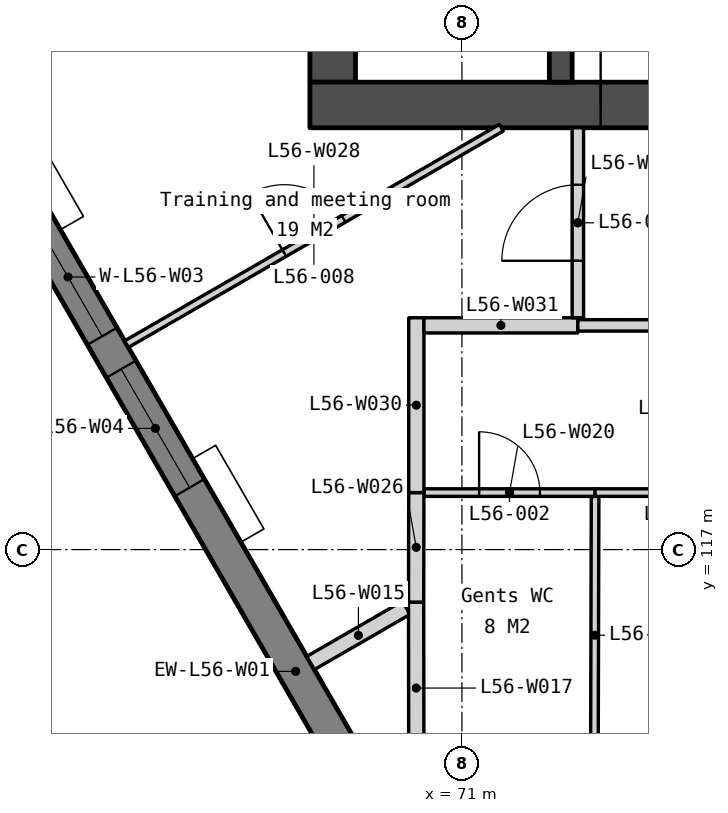
"""IFC4 building model, lengths in metres.
Left out: names, types, materials, properties, quantities, classifications, styles, units other than length and angle.
Written with IfcOpenShell. Run it as: python <this file> out.ifc"""

import sys

from ifc_helpers import new_model, si_unit, direction, frame, frame_2d, origin, place, context, subcontext, project, spatial, polyline, rectangle, outline, extrude, element, fill, save


model = new_model("IFC4")
c1 = context("Model", 3, precision=1e-05, world=origin(), true_north=direction((0.0, 1.0)))
c2 = subcontext(c1, "Body", "Model", "MODEL_VIEW")
j1 = project(units=[si_unit("LENGTHUNIT", "METRE"), si_unit("PLANEANGLEUNIT", "RADIAN")], contexts=[c1])
p1 = place(None, origin())
s1 = spatial("IfcSite", under=j1, at=p1, CompositionType="ELEMENT")
p2 = place(p1, origin())
s2 = spatial("IfcBuilding", under=s1, at=p2, CompositionType="ELEMENT")
p3 = place(p2, frame((0.0, 0.0, 223.1)))
s3 = spatial("IfcBuildingStorey", under=s2, at=p3, CompositionType="ELEMENT", Elevation=223.1)
p4 = place(p3, frame((69.3, 133.95, 0.0), z_axis=(0.0, 0.0, 1.0), x_axis=(0.0, -1.0, 0.0)))
e1 = element("IfcWall", 1, at=p4, inside=s3, PredefinedType="SOLIDWALL", context=c2, shape_type="SweptSolid", body=[
    extrude(rectangle(XDim=10.8, YDim=0.6, at=frame_2d((5.4, 0.0))), origin(), (0.0, 0.0, 1.0), 3.6),
])
p5 = place(p3, frame((69.0, 122.85, 0.0), z_axis=(0.0, 0.0, 1.0), x_axis=(1.0, 0.0, 0.0)))
e2 = element("IfcWall", 2, at=p5, inside=s3, PredefinedType="SOLIDWALL", context=c2, shape_type="SweptSolid", body=[
    extrude(rectangle(XDim=22.0, YDim=0.6, at=frame_2d((11.0, 0.0))), origin(), (0.0, 0.0, 1.0), 3.6),
])
p6 = place(p5, frame((16.375, 0.0, 0.0)))
e3 = element("IfcOpeningElement", 3, at=p6, cuts=e2, PredefinedType="OPENING", context=c2, shape_type="SweptSolid", body=[
    extrude(rectangle(XDim=1.8, YDim=2.1, at=frame_2d((0.9, 1.05))), frame((0.0, 0.31, 0.0), z_axis=(0.0, -1.0, 0.0), x_axis=(1.0, 0.0, 0.0)), (0.0, 0.0, 1.0), 0.62),
])
p7 = place(p5, frame((3.825, 0.0, 0.0)))
e4 = element("IfcOpeningElement", 4, at=p7, cuts=e2, PredefinedType="OPENING", context=c2, shape_type="SweptSolid", body=[
    extrude(rectangle(XDim=1.8, YDim=2.1, at=frame_2d((0.9, 1.05))), frame((0.0, 0.31, 0.0), z_axis=(0.0, -1.0, 0.0), x_axis=(1.0, 0.0, 0.0)), (0.0, 0.0, 1.0), 0.62),
])
p8 = place(p5, frame((12.85, 0.0, 0.0)))
e5 = element("IfcOpeningElement", 5, at=p8, cuts=e2, PredefinedType="OPENING", context=c2, shape_type="SweptSolid", body=[
    extrude(rectangle(XDim=1.5, YDim=2.1, at=frame_2d((0.75, 1.05))), frame((0.0, 0.31, 0.0), z_axis=(0.0, -1.0, 0.0), x_axis=(1.0, 0.0, 0.0)), (0.0, 0.0, 1.0), 0.62),
])
p9 = place(p3, frame((72.3, 133.95, 0.0), z_axis=(0.0, 0.0, 1.0), x_axis=(0.0, -1.0, 0.0)))
e6 = element("IfcWall", 6, at=p9, inside=s3, PredefinedType="SOLIDWALL", context=c2, shape_type="SweptSolid", body=[
    extrude(rectangle(XDim=10.8, YDim=0.3, at=frame_2d((5.4, 0.0))), origin(), (0.0, 0.0, 1.0), 3.6),
])
p10 = place(p9, frame((6.95, 0.0, 0.0)))
e7 = element("IfcOpeningElement", 7, at=p10, cuts=e6, PredefinedType="OPENING", context=c2, shape_type="SweptSolid", body=[
    extrude(rectangle(XDim=1.1, YDim=2.1, at=frame_2d((0.55, 1.05))), frame((0.0, 0.16, 0.0), z_axis=(0.0, -1.0, 0.0), x_axis=(1.0, 0.0, 0.0)), (0.0, 0.0, 1.0), 0.32),
])
p11 = place(p9, frame((9.35, 0.0, 0.0)))
e8 = element("IfcOpeningElement", 8, at=p11, cuts=e6, PredefinedType="OPENING", context=c2, shape_type="SweptSolid", body=[
    extrude(rectangle(XDim=0.9, YDim=2.1, at=frame_2d((0.45, 1.05))), frame((0.0, 0.16, 0.0), z_axis=(0.0, -1.0, 0.0), x_axis=(1.0, 0.0, 0.0)), (0.0, 0.0, 1.0), 0.32),
])
p12 = place(p9, frame((5.1, 0.0, 0.0)))
e9 = element("IfcOpeningElement", 9, at=p12, cuts=e6, PredefinedType="OPENING", context=c2, shape_type="SweptSolid", body=[
    extrude(rectangle(XDim=1.0, YDim=2.1, at=frame_2d((0.5, 1.05))), frame((0.0, 0.16, 0.0), z_axis=(0.0, -1.0, 0.0), x_axis=(1.0, 0.0, 0.0)), (0.0, 0.0, 1.0), 0.32),
])
p13 = place(p3, frame((59.13, 132.168, -0.15), z_axis=(0.0, 0.0, 1.0), x_axis=(0.500002199942, -0.866024133644, 0.0)))
e10 = element("IfcWall", 10, at=p13, inside=s3, PredefinedType="SOLIDWALL", context=c2, shape_type="SweptSolid", body=[
    extrude(outline(polyline([(38.729, 0.0), (38.729, 3.75), (0.0, 3.75), (0.0, 0.0), (38.729, 0.0)])), frame((0.0, 0.225, 0.0), z_axis=(0.0, -1.0, 0.0), x_axis=(1.0, 0.0, 0.0)), (0.0, 0.0, 1.0), 0.45),
])
p14 = place(p13, frame((2.791, 0.0, 0.95)))
e11 = element("IfcOpeningElement", 11, at=p14, cuts=e10, PredefinedType="OPENING", context=c2, shape_type="SweptSolid", body=[
    extrude(rectangle(XDim=1.8, YDim=2.2, at=frame_2d((0.9, 1.1))), frame((0.0, 0.235, 0.0), z_axis=(0.0, -1.0, 0.0), x_axis=(1.0, 0.0, 0.0)), (0.0, 0.0, 1.0), 0.47),
])
p15 = place(p13, frame((5.091, 0.0, 0.95)))
e12 = element("IfcOpeningElement", 12, at=p15, cuts=e10, PredefinedType="OPENING", context=c2, shape_type="SweptSolid", body=[
    extrude(rectangle(XDim=1.8, YDim=2.2, at=frame_2d((0.9, 1.1))), frame((0.0, 0.235, 0.0), z_axis=(0.0, -1.0, 0.0), x_axis=(1.0, 0.0, 0.0)), (0.0, 0.0, 1.0), 0.47),
])
p16 = place(p13, frame((12.473, 0.0, 0.95)))
e13 = element("IfcOpeningElement", 13, at=p16, cuts=e10, PredefinedType="OPENING", context=c2, shape_type="SweptSolid", body=[
    extrude(rectangle(XDim=1.8, YDim=2.2, at=frame_2d((0.9, 1.1))), frame((0.0, 0.235, 0.0), z_axis=(0.0, -1.0, 0.0), x_axis=(1.0, 0.0, 0.0)), (0.0, 0.0, 1.0), 0.47),
])
p17 = place(p13, frame((14.773, 0.0, 0.95)))
e14 = element("IfcOpeningElement", 14, at=p17, cuts=e10, PredefinedType="OPENING", context=c2, shape_type="SweptSolid", body=[
    extrude(rectangle(XDim=1.8, YDim=2.2, at=frame_2d((0.9, 1.1))), frame((0.0, 0.235, 0.0), z_axis=(0.0, -1.0, 0.0), x_axis=(1.0, 0.0, 0.0)), (0.0, 0.0, 1.0), 0.47),
])
p18 = place(p13, frame((22.156, 0.0, 0.95)))
e15 = element("IfcOpeningElement", 15, at=p18, cuts=e10, PredefinedType="OPENING", context=c2, shape_type="SweptSolid", body=[
    extrude(rectangle(XDim=1.8, YDim=2.2, at=frame_2d((0.9, 1.1))), frame((0.0, 0.235, 0.0), z_axis=(0.0, -1.0, 0.0), x_axis=(1.0, 0.0, 0.0)), (0.0, 0.0, 1.0), 0.47),
])
p19 = place(p13, frame((24.456, 0.0, 0.95)))
e16 = element("IfcOpeningElement", 16, at=p19, cuts=e10, PredefinedType="OPENING", context=c2, shape_type="SweptSolid", body=[
    extrude(rectangle(XDim=1.8, YDim=2.2, at=frame_2d((0.9, 1.1))), frame((0.0, 0.235, 0.0), z_axis=(0.0, -1.0, 0.0), x_axis=(1.0, 0.0, 0.0)), (0.0, 0.0, 1.0), 0.47),
])
p20 = place(p13, frame((31.838, 0.0, 0.95)))
e17 = element("IfcOpeningElement", 17, at=p20, cuts=e10, PredefinedType="OPENING", context=c2, shape_type="SweptSolid", body=[
    extrude(rectangle(XDim=1.8, YDim=2.2, at=frame_2d((0.9, 1.1))), frame((0.0, 0.235, 0.0), z_axis=(0.0, -1.0, 0.0), x_axis=(1.0, 0.0, 0.0)), (0.0, 0.0, 1.0), 0.47),
])
p21 = place(p13, frame((34.138, 0.0, 0.95)))
e18 = element("IfcOpeningElement", 18, at=p21, cuts=e10, PredefinedType="OPENING", context=c2, shape_type="SweptSolid", body=[
    extrude(rectangle(XDim=1.8, YDim=2.2, at=frame_2d((0.9, 1.1))), frame((0.0, 0.235, 0.0), z_axis=(0.0, -1.0, 0.0), x_axis=(1.0, 0.0, 0.0)), (0.0, 0.0, 1.0), 0.47),
])
p22 = place(p3, frame((69.009, 115.508, 0.0), z_axis=(0.0, 0.0, 1.0), x_axis=(0.865958882005, 0.500115201406, 0.0)))
e19 = element("IfcWall", 19, at=p22, inside=s3, PredefinedType="PARTITIONING", context=c2, shape_type="SweptSolid", body=[
    extrude(rectangle(XDim=1.453, YDim=0.2, at=frame_2d((0.727, 0.0))), origin(), (0.0, 0.0, 1.0), 3.6),
])
p23 = place(p3, frame((70.4, 114.047, 0.0), z_axis=(0.0, 0.0, 1.0), x_axis=(-0.001295195892, 0.999999161233, 0.0)))
e20 = element("IfcWall", 20, at=p23, inside=s3, PredefinedType="PARTITIONING", context=c2, shape_type="SweptSolid", body=[
    extrude(rectangle(XDim=2.262, YDim=0.2, at=frame_2d((1.131, 0.0))), origin(), (0.0, 0.0, 1.0), 3.6),
])
p24 = place(p3, frame((72.742, 114.047, 0.0), z_axis=(0.0, 0.0, 1.0), x_axis=(0.002673429826, 0.99999642638, 0.0)))
e21 = element("IfcWall", 21, at=p24, inside=s3, PredefinedType="PARTITIONING", context=c2, shape_type="SweptSolid", body=[
    extrude(rectangle(XDim=3.653, YDim=0.1, at=frame_2d((1.826, 0.0))), origin(), (0.0, 0.0, 1.0), 3.6),
])
p25 = place(p3, frame((70.5, 117.75, 0.0), z_axis=(0.0, 0.0, 1.0), x_axis=(1.0, 0.0, 0.0)))
e22 = element("IfcWall", 22, at=p25, inside=s3, PredefinedType="PARTITIONING", context=c2, shape_type="SweptSolid", body=[
    extrude(rectangle(XDim=2.252, YDim=0.1, at=frame_2d((1.126, 0.0))), origin(), (0.0, 0.0, 1.0), 3.6),
])
p26 = place(p25, frame((0.726, 0.0, 0.0)))
e23 = element("IfcOpeningElement", 23, at=p26, cuts=e22, PredefinedType="OPENING", context=c2, shape_type="SweptSolid", body=[
    extrude(rectangle(XDim=0.8, YDim=2.1, at=frame_2d((0.4, 1.05))), frame((0.0, 0.06, 0.0), z_axis=(0.0, -1.0, 0.0), x_axis=(1.0, 0.0, 0.0)), (0.0, 0.0, 1.0), 0.12),
])
p27 = place(p3, frame((72.752, 117.75, 0.0), z_axis=(0.0, 0.0, 1.0), x_axis=(1.0, 0.0, 0.0)))
e24 = element("IfcWall", 24, at=p27, inside=s3, PredefinedType="PARTITIONING", context=c2, shape_type="SweptSolid", body=[
    extrude(rectangle(XDim=2.352, YDim=0.1, at=frame_2d((1.176, 0.0))), origin(), (0.0, 0.0, 1.0), 3.6),
])
p28 = place(p27, frame((0.776, 0.0, 0.0)))
e25 = element("IfcOpeningElement", 25, at=p28, cuts=e24, PredefinedType="OPENING", context=c2, shape_type="SweptSolid", body=[
    extrude(rectangle(XDim=0.8, YDim=2.1, at=frame_2d((0.4, 1.05))), frame((0.0, 0.06, 0.0), z_axis=(0.0, -1.0, 0.0), x_axis=(1.0, 0.0, 0.0)), (0.0, 0.0, 1.0), 0.12),
])
p29 = place(p3, frame((70.397, 116.309, 0.0), z_axis=(0.0, 0.0, 1.0), x_axis=(0.002033204879, 0.999997933037, 0.0)))
e26 = element("IfcWall", 26, at=p29, inside=s3, PredefinedType="PARTITIONING", context=c2, shape_type="SweptSolid", body=[
    extrude(rectangle(XDim=1.441, YDim=0.2, at=frame_2d((0.72, 0.0))), origin(), (0.0, 0.0, 1.0), 3.6),
])
p30 = place(p3, frame((66.587, 119.703, 0.0), z_axis=(0.0, 0.0, 1.0), x_axis=(0.866023511746, 0.500003277092, 0.0)))
e27 = element("IfcWall", 27, at=p30, inside=s3, PredefinedType="PARTITIONING", context=c2, shape_type="SweptSolid", body=[
    extrude(rectangle(XDim=5.694, YDim=0.1, at=frame_2d((2.847, 0.0))), origin(), (0.0, 0.0, 1.0), 3.6),
])
p31 = place(p30, frame((2.397, 0.0, 0.0)))
e28 = element("IfcOpeningElement", 28, at=p31, cuts=e27, PredefinedType="OPENING", context=c2, shape_type="SweptSolid", body=[
    extrude(rectangle(XDim=0.9, YDim=2.1, at=frame_2d((0.45, 1.05))), frame((0.0, 0.06, 0.0), z_axis=(0.0, -1.0, 0.0), x_axis=(1.0, 0.0, 0.0)), (0.0, 0.0, 1.0), 0.12),
])
p32 = place(p3, frame((70.4, 117.75, 0.0), z_axis=(0.0, 0.0, 1.0), x_axis=(0.0, 1.0, 0.0)))
e29 = element("IfcWall", 29, at=p32, inside=s3, PredefinedType="PARTITIONING", context=c2, shape_type="SweptSolid", body=[
    extrude(rectangle(XDim=2.3, YDim=0.2, at=frame_2d((1.15, 0.0))), origin(), (0.0, 0.0, 1.0), 3.6),
])
p33 = place(p3, frame((70.5, 119.95, 0.0), z_axis=(0.0, 0.0, 1.0), x_axis=(1.0, 0.0, 0.0)))
e30 = element("IfcWall", 30, at=p33, inside=s3, PredefinedType="PARTITIONING", context=c2, shape_type="SweptSolid", body=[
    extrude(rectangle(XDim=2.025, YDim=0.2, at=frame_2d((1.012, 0.0))), origin(), (0.0, 0.0, 1.0), 3.6),
])
p34 = place(p3, frame((72.525, 120.05, 0.0), z_axis=(0.0, 0.0, 1.0), x_axis=(0.0, 1.0, 0.0)))
e31 = element("IfcWall", 31, at=p34, inside=s3, PredefinedType="PARTITIONING", context=c2, shape_type="SweptSolid", body=[
    extrude(rectangle(XDim=2.5, YDim=0.15, at=frame_2d((1.25, 0.0))), origin(), (0.0, 0.0, 1.0), 3.6),
])
p35 = place(p34, frame((0.75, 0.0, 0.0)))
e32 = element("IfcOpeningElement", 32, at=p35, cuts=e31, PredefinedType="OPENING", context=c2, shape_type="SweptSolid", body=[
    extrude(rectangle(XDim=1.0, YDim=2.1, at=frame_2d((0.5, 1.05))), frame((0.0, 0.085, 0.0), z_axis=(0.0, -1.0, 0.0), x_axis=(1.0, 0.0, 0.0)), (0.0, 0.0, 1.0), 0.17),
])
p36 = place(p3, frame((72.525, 119.95, 0.0), z_axis=(0.0, 0.0, 1.0), x_axis=(0.999999950384, -0.000315010222, 0.0)))
e33 = element("IfcWall", 33, at=p36, inside=s3, PredefinedType="PARTITIONING", context=c2, shape_type="SweptSolid", body=[
    extrude(rectangle(XDim=6.2, YDim=0.15, at=frame_2d((3.1, 0.0))), origin(), (0.0, 0.0, 1.0), 3.6),
])
p37 = place(p36, frame((2.6, 0.0, 0.0)))
e34 = element("IfcOpeningElement", 34, at=p37, cuts=e33, PredefinedType="OPENING", context=c2, shape_type="SweptSolid", body=[
    extrude(rectangle(XDim=1.0, YDim=2.1, at=frame_2d((0.5, 1.05))), frame((0.0, 0.085, 0.0), z_axis=(0.0, -1.0, 0.0), x_axis=(1.0, 0.0, 0.0)), (0.0, 0.0, 1.0), 0.17),
])
p38 = place(p7, origin())
e35 = element("IfcDoor", 35, at=p38, inside=s3, OperationType="DOUBLE_DOOR_DOUBLE_SWING", PredefinedType="DOOR", context=c2, shape_type="SweptSolid", body=[
    extrude(rectangle(XDim=1.8, YDim=2.1, at=frame_2d((0.9, 1.05))), frame((0.0, 0.025, 0.0), z_axis=(0.0, -1.0, 0.0), x_axis=(1.0, 0.0, 0.0)), (0.0, 0.0, 1.0), 0.05),
])
fill(e4, e35)
p39 = place(p16, origin())
e36 = element("IfcWindow", 36, at=p39, inside=s3, PartitioningType="SINGLE_PANEL", PredefinedType="WINDOW", context=c2, shape_type="SweptSolid", body=[
    extrude(rectangle(XDim=1.8, YDim=2.2, at=frame_2d((0.9, 1.1))), frame((0.0, 0.03, 0.0), z_axis=(0.0, -1.0, 0.0), x_axis=(1.0, 0.0, 0.0)), (0.0, 0.0, 1.0), 0.06),
])
fill(e13, e36)
p40 = place(p17, origin())
e37 = element("IfcWindow", 37, at=p40, inside=s3, PartitioningType="SINGLE_PANEL", PredefinedType="WINDOW", context=c2, shape_type="SweptSolid", body=[
    extrude(rectangle(XDim=1.8, YDim=2.2, at=frame_2d((0.9, 1.1))), frame((0.0, 0.03, 0.0), z_axis=(0.0, -1.0, 0.0), x_axis=(1.0, 0.0, 0.0)), (0.0, 0.0, 1.0), 0.06),
])
fill(e14, e37)
p41 = place(p26, origin())
e38 = element("IfcDoor", 38, at=p41, inside=s3, OperationType="SINGLE_SWING_LEFT", PredefinedType="DOOR", context=c2, shape_type="SweptSolid", body=[
    extrude(rectangle(XDim=0.8, YDim=2.1, at=frame_2d((0.4, 1.05))), frame((0.0, 0.025, 0.0), z_axis=(0.0, -1.0, 0.0), x_axis=(1.0, 0.0, 0.0)), (0.0, 0.0, 1.0), 0.05),
])
fill(e23, e38)
p42 = place(p31, origin())
e39 = element("IfcDoor", 39, at=p42, inside=s3, OperationType="SINGLE_SWING_LEFT", PredefinedType="DOOR", context=c2, shape_type="SweptSolid", body=[
    extrude(rectangle(XDim=0.9, YDim=2.1, at=frame_2d((0.45, 1.05))), frame((0.0, 0.025, 0.0), z_axis=(0.0, -1.0, 0.0), x_axis=(1.0, 0.0, 0.0)), (0.0, 0.0, 1.0), 0.05),
])
fill(e28, e39)
p43 = place(p35, origin())
e40 = element("IfcDoor", 40, at=p43, inside=s3, OperationType="SINGLE_SWING_LEFT", PredefinedType="DOOR", context=c2, shape_type="SweptSolid", body=[
    extrude(rectangle(XDim=1.0, YDim=2.1, at=frame_2d((0.5, 1.05))), frame((0.0, 0.025, 0.0), z_axis=(0.0, -1.0, 0.0), x_axis=(1.0, 0.0, 0.0)), (0.0, 0.0, 1.0), 0.05),
])
fill(e32, e40)
save(model, sys.argv[1])
